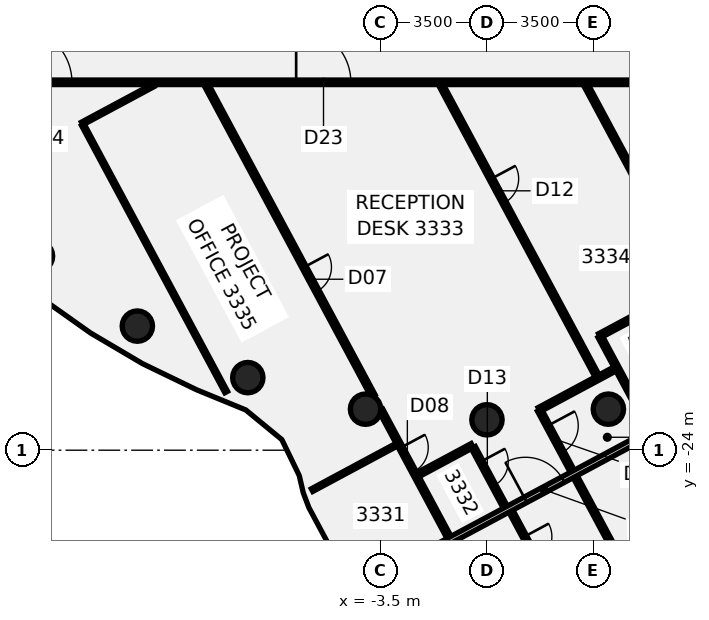
"""IFC4 building model, lengths in metres.
Left out: names, types, materials, properties, quantities, classifications, styles, units other than length and angle.
Written with IfcOpenShell. Run it as: python <this file> out.ifc"""

import sys

from ifc_helpers import new_model, si_unit, direction, frame, frame_2d, origin, origin_2d, place, context, subcontext, project, spatial, rectangle, circle, extrude, element, fill, save


model = new_model("IFC4")
c1 = context("Model", 3, precision=1e-05, world=origin(), true_north=direction((0.0, 1.0)))
c2 = subcontext(c1, "Body", "Model", "MODEL_VIEW")
j1 = project(units=[si_unit("LENGTHUNIT", "METRE"), si_unit("PLANEANGLEUNIT", "RADIAN")], contexts=[c1])
p1 = place(None, origin())
s1 = spatial("IfcSite", under=j1, at=p1, CompositionType="ELEMENT")
p2 = place(p1, origin())
s2 = spatial("IfcBuilding", under=s1, at=p2, CompositionType="ELEMENT")
p3 = place(p2, frame((0.0, 0.0, 136.75)))
s3 = spatial("IfcBuildingStorey", under=s2, at=p3, CompositionType="ELEMENT", Elevation=136.75)
for number, where, z_axis, x_axis in (
    (1, (-14.784, -17.619, -0.14), (0.0, 0.0, 1.0), (1.0, 0.0, 0.0)),
    (2, (-11.5, -19.919, -0.14), (0.0, 0.0, 1.0), (1.0, 0.0, 0.0)),
    (3, (-7.866, -21.613, -0.14), (0.0, 0.0, 1.0), (1.0, 0.0, 0.0)),
    (4, (-3.994, -22.651, -0.14), (0.0, 0.0, 1.0), (1.0, 0.0, 0.0)),
    (5, (0.0, -23.0, -0.14), (0.0, 0.0, 1.0), (1.0, 0.0, 0.0)),
    (6, (3.994, -22.651, -0.14), (0.0, 0.0, 1.0), (1.0, 0.0, 0.0)),
):
    element("IfcColumn", number, at=place(p3, frame(where, z_axis=z_axis, x_axis=x_axis)), inside=s3, PredefinedType="COLUMN", context=c2, shape_type="SweptSolid", body=[
        extrude(circle(Radius=0.5, at=origin_2d()), origin(), (0.0, 0.0, 1.0), 3.75),
    ])
p4 = place(p3, frame((-13.292, -13.299, 0.0), z_axis=(0.0, 0.0, 1.0), x_axis=(0.472694845197, -0.881226181706, 0.0)))
e7 = element("IfcWall", 7, at=p4, inside=s3, PredefinedType="PARTITIONING", context=c2, shape_type="SweptSolid", body=[
    extrude(rectangle(XDim=9.973, YDim=0.1, at=frame_2d((4.986, 0.0))), origin(), (0.0, 0.0, 1.0), 3.01),
])
p5 = place(p3, frame((-9.226, -11.992, 0.0), z_axis=(0.0, 0.0, 1.0), x_axis=(0.472684868369, -0.881231533262, 0.0)))
e8 = element("IfcWall", 8, at=p5, inside=s3, PredefinedType="PARTITIONING", context=c2, shape_type="SweptSolid", body=[
    extrude(rectangle(XDim=11.591, YDim=0.15, at=frame_2d((5.795, 0.0))), origin(), (0.0, 0.0, 1.0), 3.01),
])
p6 = place(p5, frame((6.795, 0.0, 0.0)))
e9 = element("IfcOpeningElement", 9, at=p6, cuts=e8, PredefinedType="OPENING", context=c2, shape_type="SweptSolid", body=[
    extrude(rectangle(XDim=0.9, YDim=2.1, at=frame_2d((0.45, 1.05))), frame((0.0, 0.085, 0.0), z_axis=(0.0, -1.0, 0.0), x_axis=(1.0, 0.0, 0.0)), (0.0, 0.0, 1.0), 0.17),
])
p7 = place(p3, frame((-3.492, -22.682, 0.0), z_axis=(0.0, 0.0, 1.0), x_axis=(0.472689207633, -0.881229205705, 0.0)))
e10 = element("IfcWall", 10, at=p7, inside=s3, PredefinedType="PARTITIONING", context=c2, shape_type="SweptSolid", body=[
    extrude(rectangle(XDim=4.75, YDim=0.15, at=frame_2d((2.375, 0.0))), origin(), (0.0, 0.0, 1.0), 3.01),
])
p8 = place(p7, frame((1.399, 0.0, 0.0)))
e11 = element("IfcOpeningElement", 11, at=p8, cuts=e10, PredefinedType="OPENING", context=c2, shape_type="SweptSolid", body=[
    extrude(rectangle(XDim=0.9, YDim=2.1, at=frame_2d((0.45, 1.05))), frame((0.0, 0.085, 0.0), z_axis=(0.0, -1.0, 0.0), x_axis=(1.0, 0.0, 0.0)), (0.0, 0.0, 1.0), 0.17),
])
p9 = place(p3, frame((-1.51, -11.992, 0.0), z_axis=(0.0, 0.0, 1.0), x_axis=(0.472657089114, -0.881246433247, 0.0)))
e12 = element("IfcWall", 12, at=p9, inside=s3, PredefinedType="PARTITIONING", context=c2, shape_type="SweptSolid", body=[
    extrude(rectangle(XDim=10.853, YDim=0.15, at=frame_2d((5.426, 0.0))), origin(), (0.0, 0.0, 1.0), 3.01),
])
p10 = place(p9, frame((3.495, 0.0, 0.0)))
e13 = element("IfcOpeningElement", 13, at=p10, cuts=e12, PredefinedType="OPENING", context=c2, shape_type="SweptSolid", body=[
    extrude(rectangle(XDim=0.9, YDim=2.1, at=frame_2d((0.45, 1.05))), frame((0.0, 0.085, 0.0), z_axis=(0.0, -1.0, 0.0), x_axis=(1.0, 0.0, 0.0)), (0.0, 0.0, 1.0), 0.17),
])
p11 = place(p3, frame((-0.448, -23.914, 0.0), z_axis=(0.0, 0.0, 1.0), x_axis=(0.472830170136, -0.881153579241, 0.0)))
e14 = element("IfcWall", 14, at=p11, inside=s3, PredefinedType="PARTITIONING", context=c2, shape_type="SweptSolid", body=[
    extrude(rectangle(XDim=2.225, YDim=0.15, at=frame_2d((1.113, 0.0))), origin(), (0.0, 0.0, 1.0), 3.01),
])
p12 = place(p11, frame((0.525, 0.0, 0.0)))
e15 = element("IfcOpeningElement", 15, at=p12, cuts=e14, PredefinedType="OPENING", context=c2, shape_type="SweptSolid", body=[
    extrude(rectangle(XDim=0.9, YDim=2.1, at=frame_2d((0.45, 1.05))), frame((0.0, 0.085, 0.0), z_axis=(0.0, -1.0, 0.0), x_axis=(1.0, 0.0, 0.0)), (0.0, 0.0, 1.0), 0.17),
])
p13 = place(p3, frame((0.786, -26.004, 0.0), z_axis=(0.0, 0.0, 1.0), x_axis=(0.472779380867, -0.88118083106, 0.0)))
e16 = element("IfcWall", 16, at=p13, inside=s3, PredefinedType="PARTITIONING", context=c2, shape_type="SweptSolid", body=[
    extrude(rectangle(XDim=3.861, YDim=0.15, at=frame_2d((1.93, 0.0))), origin(), (0.0, 0.0, 1.0), 3.01),
])
p14 = place(p13, frame((0.95, 0.0, 0.0)))
e17 = element("IfcOpeningElement", 17, at=p14, cuts=e16, PredefinedType="OPENING", context=c2, shape_type="SweptSolid", body=[
    extrude(rectangle(XDim=0.9, YDim=2.1, at=frame_2d((0.45, 1.05))), frame((0.0, 0.085, 0.0), z_axis=(0.0, -1.0, 0.0), x_axis=(1.0, 0.0, 0.0)), (0.0, 0.0, 1.0), 0.17),
])
p15 = place(p3, frame((1.729, -22.684, 0.0), z_axis=(0.0, 0.0, 1.0), x_axis=(0.47285390864, -0.881140840663, 0.0)))
e18 = element("IfcWall", 18, at=p15, inside=s3, PredefinedType="PARTITIONING", context=c2, shape_type="SweptSolid", body=[
    extrude(rectangle(XDim=20.305, YDim=0.15, at=frame_2d((10.152, 0.0))), origin(), (0.0, 0.0, 1.0), 3.01),
])
p16 = place(p15, frame((0.58, 0.0, 0.0)))
e19 = element("IfcOpeningElement", 19, at=p16, cuts=e18, PredefinedType="OPENING", context=c2, shape_type="SweptSolid", body=[
    extrude(rectangle(XDim=1.0, YDim=2.1, at=frame_2d((0.5, 1.05))), frame((0.0, 0.085, 0.0), z_axis=(0.0, -1.0, 0.0), x_axis=(1.0, 0.0, 0.0)), (0.0, 0.0, 1.0), 0.17),
])
p17 = place(p15, frame((10.63, 0.0, 0.0)))
e20 = element("IfcOpeningElement", 20, at=p17, cuts=e18, PredefinedType="OPENING", context=c2, shape_type="SweptSolid", body=[
    extrude(rectangle(XDim=0.9, YDim=2.1, at=frame_2d((0.45, 1.05))), frame((0.0, 0.085, 0.0), z_axis=(0.0, -1.0, 0.0), x_axis=(1.0, 0.0, 0.0)), (0.0, 0.0, 1.0), 0.17),
])
p18 = place(p15, frame((17.081, 0.0, 0.0)))
e21 = element("IfcOpeningElement", 21, at=p18, cuts=e18, PredefinedType="OPENING", context=c2, shape_type="SweptSolid", body=[
    extrude(rectangle(XDim=0.9, YDim=2.1, at=frame_2d((0.45, 1.05))), frame((0.0, 0.085, 0.0), z_axis=(0.0, -1.0, 0.0), x_axis=(1.0, 0.0, 0.0)), (0.0, 0.0, 1.0), 0.17),
])
p19 = place(p3, frame((3.257, -11.992, 0.0), z_axis=(0.0, 0.0, 1.0), x_axis=(0.47270123822, -0.881222752421, 0.0)))
e22 = element("IfcWall", 22, at=p19, inside=s3, PredefinedType="PARTITIONING", context=c2, shape_type="SweptSolid", body=[
    extrude(rectangle(XDim=10.56, YDim=0.15, at=frame_2d((5.28, 0.0))), origin(), (0.0, 0.0, 1.0), 3.01),
])
p20 = place(p3, frame((3.717, -20.256, 0.0), z_axis=(0.0, 0.0, 1.0), x_axis=(0.472400501261, -0.881384006213, 0.0)))
e23 = element("IfcWall", 23, at=p20, inside=s3, PredefinedType="PARTITIONING", context=c2, shape_type="SweptSolid", body=[
    extrude(rectangle(XDim=3.48, YDim=0.15, at=frame_2d((1.74, 0.0))), origin(), (0.0, 0.0, 1.0), 3.01),
])
p21 = place(p3, frame((-17.1, -11.9, 0.0), z_axis=(0.0, 0.0, 1.0), x_axis=(1.0, 0.0, 0.0)))
e24 = element("IfcWall", 24, at=p21, inside=s3, PredefinedType="PARTITIONING", context=c2, shape_type="SweptSolid", body=[
    extrude(rectangle(XDim=34.165, YDim=0.15, at=frame_2d((17.083, 0.0))), origin(), (0.0, 0.0, 1.0), 3.01),
])
p22 = place(p21, frame((10.824, 0.0, 0.0)))
e25 = element("IfcOpeningElement", 25, at=p22, cuts=e24, PredefinedType="OPENING", context=c2, shape_type="SweptSolid", body=[
    extrude(rectangle(XDim=1.8, YDim=2.1, at=frame_2d((0.9, 1.05))), frame((0.0, 0.085, 0.0), z_axis=(0.0, -1.0, 0.0), x_axis=(1.0, 0.0, 0.0)), (0.0, 0.0, 1.0), 0.17),
])
p23 = place(p21, frame((1.65, 0.0, 0.0)))
e26 = element("IfcOpeningElement", 26, at=p23, cuts=e24, PredefinedType="OPENING", context=c2, shape_type="SweptSolid", body=[
    extrude(rectangle(XDim=1.8, YDim=2.1, at=frame_2d((0.9, 1.05))), frame((0.0, 0.085, 0.0), z_axis=(0.0, -1.0, 0.0), x_axis=(1.0, 0.0, 0.0)), (0.0, 0.0, 1.0), 0.17),
])
p24 = place(p21, frame((26.307, 0.0, 0.0)))
e27 = element("IfcOpeningElement", 27, at=p24, cuts=e24, PredefinedType="OPENING", context=c2, shape_type="SweptSolid", body=[
    extrude(rectangle(XDim=1.8, YDim=2.1, at=frame_2d((0.9, 1.05))), frame((0.0, 0.085, 0.0), z_axis=(0.0, -1.0, 0.0), x_axis=(1.0, 0.0, 0.0)), (0.0, 0.0, 1.0), 0.17),
])
p25 = place(p3, frame((-13.315, -13.255, 0.0), z_axis=(0.0, 0.0, 1.0), x_axis=(0.881310541347, 0.472537543176, 0.0)))
e28 = element("IfcWall", 28, at=p25, inside=s3, PredefinedType="PARTITIONING", context=c2, shape_type="SweptSolid", body=[
    extrude(rectangle(XDim=2.657, YDim=0.1, at=frame_2d((1.329, 0.0))), origin(), (0.0, 0.0, 1.0), 3.01),
])
p26 = place(p3, frame((-5.753, -25.314, 0.0), z_axis=(0.0, 0.0, 1.0), x_axis=(0.881075493671, 0.472975659471, 0.0)))
e29 = element("IfcWall", 29, at=p26, inside=s3, PredefinedType="PARTITIONING", context=c2, shape_type="SweptSolid", body=[
    extrude(rectangle(XDim=3.161, YDim=0.1, at=frame_2d((1.581, 0.0))), origin(), (0.0, 0.0, 1.0), 3.01),
])
p27 = place(p3, frame((3.707, -20.235, 0.0), z_axis=(0.0, 0.0, 1.0), x_axis=(0.881086943658, 0.472954329419, 0.0)))
e30 = element("IfcWall", 30, at=p27, inside=s3, PredefinedType="PARTITIONING", context=c2, shape_type="SweptSolid", body=[
    extrude(rectangle(XDim=2.199, YDim=0.15, at=frame_2d((1.1, 0.0))), origin(), (0.0, 0.0, 1.0), 3.01),
])
p28 = place(p3, frame((-4.107, -28.515, 0.0), z_axis=(0.0, 0.0, 1.0), x_axis=(0.881221254129, 0.472704031368, 0.0)))
e31 = element("IfcWall", 31, at=p28, inside=s3, PredefinedType="PARTITIONING", context=c2, shape_type="SweptSolid", body=[
    extrude(rectangle(XDim=13.545, YDim=0.2, at=frame_2d((6.772, 0.0))), origin(), (0.0, 0.0, 1.0), 3.01),
])
p29 = place(p28, frame((6.099, 0.0, 0.0)))
e32 = element("IfcOpeningElement", 32, at=p29, cuts=e31, PredefinedType="OPENING", context=c2, shape_type="SweptSolid", body=[
    extrude(rectangle(XDim=1.4, YDim=2.1, at=frame_2d((0.7, 1.05))), frame((0.0, 0.11, 0.0), z_axis=(0.0, -1.0, 0.0), x_axis=(1.0, 0.0, 0.0)), (0.0, 0.0, 1.0), 0.22),
])
p30 = place(p3, frame((-2.268, -24.805, 0.0), z_axis=(0.0, 0.0, 1.0), x_axis=(0.881101445607, 0.472927312121, 0.0)))
e33 = element("IfcWall", 33, at=p30, inside=s3, PredefinedType="PARTITIONING", context=c2, shape_type="SweptSolid", body=[
    extrude(rectangle(XDim=2.025, YDim=0.15, at=frame_2d((1.012, 0.0))), origin(), (0.0, 0.0, 1.0), 3.01),
])
p31 = place(p3, frame((1.719, -22.666, 0.0), z_axis=(0.0, 0.0, 1.0), x_axis=(0.881125139321, 0.47288316618, 0.0)))
e34 = element("IfcWall", 34, at=p31, inside=s3, PredefinedType="PARTITIONING", context=c2, shape_type="SweptSolid", body=[
    extrude(rectangle(XDim=2.825, YDim=0.15, at=frame_2d((1.413, 0.0))), origin(), (0.0, 0.0, 1.0), 3.01),
])
p32 = place(p6, frame((0.9, 0.0, 0.0), z_axis=(0.0, 0.0, 1.0), x_axis=(-1.0, 0.0, 0.0)))
e35 = element("IfcDoor", 35, at=p32, inside=s3, OperationType="SINGLE_SWING_RIGHT", PredefinedType="DOOR", context=c2, shape_type="SweptSolid", body=[
    extrude(rectangle(XDim=0.9, YDim=2.1, at=frame_2d((0.45, 1.05))), frame((0.0, 0.025, 0.0), z_axis=(0.0, -1.0, 0.0), x_axis=(1.0, 0.0, 0.0)), (0.0, 0.0, 1.0), 0.05),
])
fill(e9, e35)
p33 = place(p8, frame((0.9, 0.0, 0.0), z_axis=(0.0, 0.0, 1.0), x_axis=(-1.0, 0.0, 0.0)))
e36 = element("IfcDoor", 36, at=p33, inside=s3, OperationType="SINGLE_SWING_LEFT", PredefinedType="DOOR", context=c2, shape_type="SweptSolid", body=[
    extrude(rectangle(XDim=0.9, YDim=2.1, at=frame_2d((0.45, 1.05))), frame((0.0, 0.025, 0.0), z_axis=(0.0, -1.0, 0.0), x_axis=(1.0, 0.0, 0.0)), (0.0, 0.0, 1.0), 0.05),
])
fill(e11, e36)
p34 = place(p10, origin())
e37 = element("IfcDoor", 37, at=p34, inside=s3, OperationType="SINGLE_SWING_RIGHT", PredefinedType="DOOR", context=c2, shape_type="SweptSolid", body=[
    extrude(rectangle(XDim=0.9, YDim=2.1, at=frame_2d((0.45, 1.05))), frame((0.0, 0.025, 0.0), z_axis=(0.0, -1.0, 0.0), x_axis=(1.0, 0.0, 0.0)), (0.0, 0.0, 1.0), 0.05),
])
fill(e13, e37)
p35 = place(p12, frame((0.9, 0.0, 0.0), z_axis=(0.0, 0.0, 1.0), x_axis=(-1.0, 0.0, 0.0)))
e38 = element("IfcDoor", 38, at=p35, inside=s3, OperationType="SINGLE_SWING_LEFT", PredefinedType="DOOR", context=c2, shape_type="SweptSolid", body=[
    extrude(rectangle(XDim=0.9, YDim=2.1, at=frame_2d((0.45, 1.05))), frame((0.0, 0.025, 0.0), z_axis=(0.0, -1.0, 0.0), x_axis=(1.0, 0.0, 0.0)), (0.0, 0.0, 1.0), 0.05),
])
fill(e15, e38)
p36 = place(p14, frame((0.9, 0.0, 0.0), z_axis=(0.0, 0.0, 1.0), x_axis=(-1.0, 0.0, 0.0)))
e39 = element("IfcDoor", 39, at=p36, inside=s3, OperationType="SINGLE_SWING_LEFT", PredefinedType="DOOR", context=c2, shape_type="SweptSolid", body=[
    extrude(rectangle(XDim=0.9, YDim=2.1, at=frame_2d((0.45, 1.05))), frame((0.0, 0.025, 0.0), z_axis=(0.0, -1.0, 0.0), x_axis=(1.0, 0.0, 0.0)), (0.0, 0.0, 1.0), 0.05),
])
fill(e17, e39)
p37 = place(p16, origin())
e40 = element("IfcDoor", 40, at=p37, inside=s3, OperationType="SINGLE_SWING_RIGHT", PredefinedType="DOOR", context=c2, shape_type="SweptSolid", body=[
    extrude(rectangle(XDim=1.0, YDim=2.1, at=frame_2d((0.5, 1.05))), frame((0.0, 0.025, 0.0), z_axis=(0.0, -1.0, 0.0), x_axis=(1.0, 0.0, 0.0)), (0.0, 0.0, 1.0), 0.05),
])
fill(e19, e40)
p38 = place(p22, origin())
e41 = element("IfcDoor", 41, at=p38, inside=s3, OperationType="DOUBLE_DOOR_SINGLE_SWING", PredefinedType="DOOR", context=c2, shape_type="SweptSolid", body=[
    extrude(rectangle(XDim=1.8, YDim=2.1, at=frame_2d((0.9, 1.05))), frame((0.0, 0.025, 0.0), z_axis=(0.0, -1.0, 0.0), x_axis=(1.0, 0.0, 0.0)), (0.0, 0.0, 1.0), 0.05),
])
fill(e25, e41)
p39 = place(p23, frame((1.8, 0.0, 0.0), z_axis=(0.0, 0.0, 1.0), x_axis=(-1.0, 0.0, 0.0)))
e42 = element("IfcDoor", 42, at=p39, inside=s3, OperationType="DOUBLE_DOOR_SINGLE_SWING", PredefinedType="DOOR", context=c2, shape_type="SweptSolid", body=[
    extrude(rectangle(XDim=1.8, YDim=2.1, at=frame_2d((0.9, 1.05))), frame((0.0, 0.025, 0.0), z_axis=(0.0, -1.0, 0.0), x_axis=(1.0, 0.0, 0.0)), (0.0, 0.0, 1.0), 0.05),
])
fill(e26, e42)
p40 = place(p29, origin())
e43 = element("IfcDoor", 43, at=p40, inside=s3, OperationType="DOUBLE_DOOR_SINGLE_SWING", PredefinedType="DOOR", context=c2, shape_type="SweptSolid", body=[
    extrude(rectangle(XDim=1.4, YDim=2.1, at=frame_2d((0.7, 1.05))), frame((0.0, 0.025, 0.0), z_axis=(0.0, -1.0, 0.0), x_axis=(1.0, 0.0, 0.0)), (0.0, 0.0, 1.0), 0.05),
])
fill(e32, e43)
save(model, sys.argv[1])
